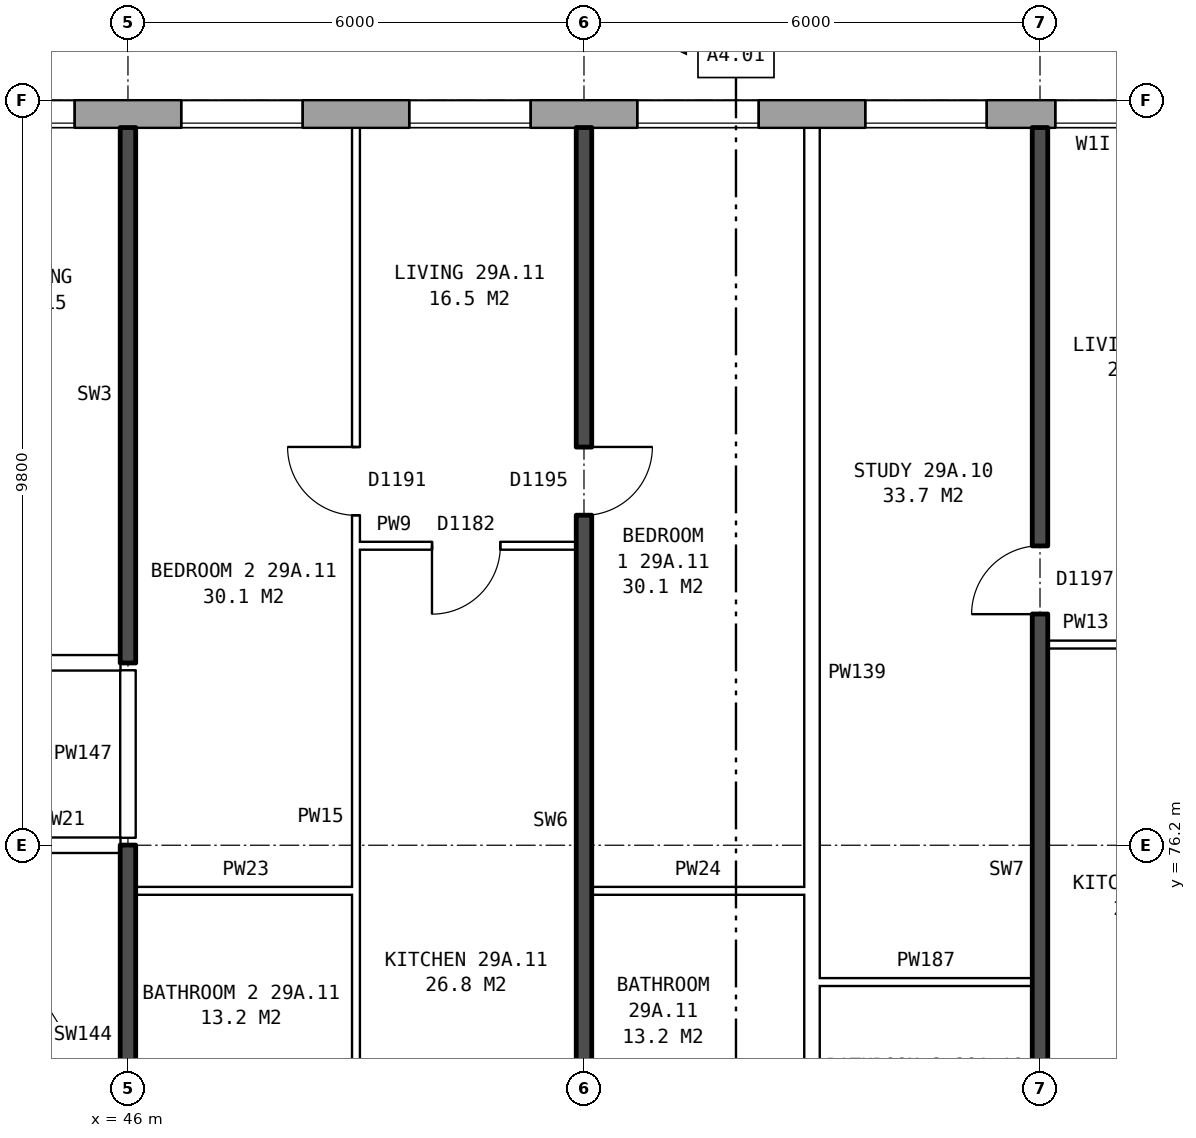
"""IFC4 building model, lengths in metres.
Left out: names, types, materials, properties, quantities, classifications, styles, units other than length and angle.
Written with IfcOpenShell. Run it as: python <this file> out.ifc"""

import sys

from ifc_helpers import new_model, si_unit, direction, frame, frame_2d, origin, place, context, subcontext, project, spatial, rectangle, extrude, element, fill, save


model = new_model("IFC4")
c1 = context("Model", 3, precision=1e-05, world=origin(), true_north=direction((0.0, 1.0)))
c2 = subcontext(c1, "Body", "Model", "MODEL_VIEW")
j1 = project(units=[si_unit("LENGTHUNIT", "METRE"), si_unit("PLANEANGLEUNIT", "RADIAN")], contexts=[c1])
p1 = place(None, origin())
s1 = spatial("IfcSite", under=j1, at=p1, CompositionType="ELEMENT")
p2 = place(p1, origin())
s2 = spatial("IfcBuilding", under=s1, at=p2, CompositionType="ELEMENT")
p3 = place(p2, frame((0.0, 0.0, 105.7)))
s3 = spatial("IfcBuildingStorey", under=s2, at=p3, CompositionType="ELEMENT", Elevation=105.7)
p4 = place(p3, frame((72.925, 85.82, 0.0), z_axis=(0.0, 0.0, 1.0), x_axis=(-1.0, 0.0, 0.0)))
e1 = element("IfcWall", 1, at=p4, inside=s3, PredefinedType="STANDARD", context=c2, shape_type="SweptSolid", body=[
    extrude(rectangle(XDim=44.851, YDim=0.36, at=frame_2d((22.425, 0.0))), origin(), (0.0, 0.0, 1.0), 2.85),
])
p5 = place(p4, frame((0.625, 0.0, 0.8)))
e2 = element("IfcOpeningElement", 2, at=p5, cuts=e1, PredefinedType="OPENING", context=c2, shape_type="SweptSolid", body=[
    extrude(rectangle(XDim=1.6, YDim=1.8, at=frame_2d((0.8, 0.9))), frame((0.0, 0.19, 0.0), z_axis=(0.0, -1.0, 0.0), x_axis=(1.0, 0.0, 0.0)), (0.0, 0.0, 1.0), 0.38),
])
p6 = place(p4, frame((3.625, 0.0, 0.8)))
e3 = element("IfcOpeningElement", 3, at=p6, cuts=e1, PredefinedType="OPENING", context=c2, shape_type="SweptSolid", body=[
    extrude(rectangle(XDim=1.6, YDim=1.8, at=frame_2d((0.8, 0.9))), frame((0.0, 0.19, 0.0), z_axis=(0.0, -1.0, 0.0), x_axis=(1.0, 0.0, 0.0)), (0.0, 0.0, 1.0), 0.38),
])
p7 = place(p4, frame((6.625, 0.0, 0.8)))
e4 = element("IfcOpeningElement", 4, at=p7, cuts=e1, PredefinedType="OPENING", context=c2, shape_type="SweptSolid", body=[
    extrude(rectangle(XDim=1.6, YDim=1.8, at=frame_2d((0.8, 0.9))), frame((0.0, 0.19, 0.0), z_axis=(0.0, -1.0, 0.0), x_axis=(1.0, 0.0, 0.0)), (0.0, 0.0, 1.0), 0.38),
])
p8 = place(p4, frame((9.125, 0.0, 0.8)))
e5 = element("IfcOpeningElement", 5, at=p8, cuts=e1, PredefinedType="OPENING", context=c2, shape_type="SweptSolid", body=[
    extrude(rectangle(XDim=1.6, YDim=1.8, at=frame_2d((0.8, 0.9))), frame((0.0, 0.19, 0.0), z_axis=(0.0, -1.0, 0.0), x_axis=(1.0, 0.0, 0.0)), (0.0, 0.0, 1.0), 0.38),
])
p9 = place(p4, frame((12.825, 0.0, 0.55)))
e6 = element("IfcOpeningElement", 6, at=p9, cuts=e1, PredefinedType="OPENING", context=c2, shape_type="SweptSolid", body=[
    extrude(rectangle(XDim=0.6, YDim=0.9, at=frame_2d((0.3, 0.45))), frame((0.0, 0.19, 0.0), z_axis=(0.0, -1.0, 0.0), x_axis=(1.0, 0.0, 0.0)), (0.0, 0.0, 1.0), 0.38),
])
p10 = place(p4, frame((15.625, 0.0, 0.8)))
e7 = element("IfcOpeningElement", 7, at=p10, cuts=e1, PredefinedType="OPENING", context=c2, shape_type="SweptSolid", body=[
    extrude(rectangle(XDim=1.6, YDim=1.8, at=frame_2d((0.8, 0.9))), frame((0.0, 0.19, 0.0), z_axis=(0.0, -1.0, 0.0), x_axis=(1.0, 0.0, 0.0)), (0.0, 0.0, 1.0), 0.38),
])
p11 = place(p4, frame((18.625, 0.0, 0.8)))
e8 = element("IfcOpeningElement", 8, at=p11, cuts=e1, PredefinedType="OPENING", context=c2, shape_type="SweptSolid", body=[
    extrude(rectangle(XDim=1.6, YDim=1.8, at=frame_2d((0.8, 0.9))), frame((0.0, 0.19, 0.0), z_axis=(0.0, -1.0, 0.0), x_axis=(1.0, 0.0, 0.0)), (0.0, 0.0, 1.0), 0.38),
])
p12 = place(p4, frame((21.625, 0.0, 0.8)))
e9 = element("IfcOpeningElement", 9, at=p12, cuts=e1, PredefinedType="OPENING", context=c2, shape_type="SweptSolid", body=[
    extrude(rectangle(XDim=1.6, YDim=1.8, at=frame_2d((0.8, 0.9))), frame((0.0, 0.19, 0.0), z_axis=(0.0, -1.0, 0.0), x_axis=(1.0, 0.0, 0.0)), (0.0, 0.0, 1.0), 0.38),
])
p13 = place(p4, frame((24.625, 0.0, 0.8)))
e10 = element("IfcOpeningElement", 10, at=p13, cuts=e1, PredefinedType="OPENING", context=c2, shape_type="SweptSolid", body=[
    extrude(rectangle(XDim=1.6, YDim=1.8, at=frame_2d((0.8, 0.9))), frame((0.0, 0.19, 0.0), z_axis=(0.0, -1.0, 0.0), x_axis=(1.0, 0.0, 0.0)), (0.0, 0.0, 1.0), 0.38),
])
p14 = place(p4, frame((27.625, 0.0, 0.8)))
e11 = element("IfcOpeningElement", 11, at=p14, cuts=e1, PredefinedType="OPENING", context=c2, shape_type="SweptSolid", body=[
    extrude(rectangle(XDim=1.6, YDim=1.8, at=frame_2d((0.8, 0.9))), frame((0.0, 0.19, 0.0), z_axis=(0.0, -1.0, 0.0), x_axis=(1.0, 0.0, 0.0)), (0.0, 0.0, 1.0), 0.38),
])
p15 = place(p4, frame((29.525, 0.0, 0.8)))
e12 = element("IfcOpeningElement", 12, at=p15, cuts=e1, PredefinedType="OPENING", context=c2, shape_type="SweptSolid", body=[
    extrude(rectangle(XDim=0.8, YDim=1.8, at=frame_2d((0.4, 0.9))), frame((0.0, 0.19, 0.0), z_axis=(0.0, -1.0, 0.0), x_axis=(1.0, 0.0, 0.0)), (0.0, 0.0, 1.0), 0.38),
])
p16 = place(p4, frame((33.325, 0.0, 1.4)))
e13 = element("IfcOpeningElement", 13, at=p16, cuts=e1, PredefinedType="OPENING", context=c2, shape_type="SweptSolid", body=[
    extrude(rectangle(XDim=1.0, YDim=1.2, at=frame_2d((0.5, 0.6))), frame((0.0, 0.19, 0.0), z_axis=(0.0, -1.0, 0.0), x_axis=(1.0, 0.0, 0.0)), (0.0, 0.0, 1.0), 0.38),
])
p17 = place(p4, frame((36.625, 0.0, 0.8)))
e14 = element("IfcOpeningElement", 14, at=p17, cuts=e1, PredefinedType="OPENING", context=c2, shape_type="SweptSolid", body=[
    extrude(rectangle(XDim=1.6, YDim=1.8, at=frame_2d((0.8, 0.9))), frame((0.0, 0.19, 0.0), z_axis=(0.0, -1.0, 0.0), x_axis=(1.0, 0.0, 0.0)), (0.0, 0.0, 1.0), 0.38),
])
p18 = place(p4, frame((39.625, 0.0, 0.8)))
e15 = element("IfcOpeningElement", 15, at=p18, cuts=e1, PredefinedType="OPENING", context=c2, shape_type="SweptSolid", body=[
    extrude(rectangle(XDim=1.6, YDim=1.8, at=frame_2d((0.8, 0.9))), frame((0.0, 0.19, 0.0), z_axis=(0.0, -1.0, 0.0), x_axis=(1.0, 0.0, 0.0)), (0.0, 0.0, 1.0), 0.38),
])
p19 = place(p4, frame((42.625, 0.0, 0.8)))
e16 = element("IfcOpeningElement", 16, at=p19, cuts=e1, PredefinedType="OPENING", context=c2, shape_type="SweptSolid", body=[
    extrude(rectangle(XDim=1.6, YDim=1.8, at=frame_2d((0.8, 0.9))), frame((0.0, 0.19, 0.0), z_axis=(0.0, -1.0, 0.0), x_axis=(1.0, 0.0, 0.0)), (0.0, 0.0, 1.0), 0.38),
])
p20 = place(p4, frame((11.025, 0.0, 1.5)))
e17 = element("IfcOpeningElement", 17, at=p20, cuts=e1, PredefinedType="OPENING", context=c2, shape_type="SweptSolid", body=[
    extrude(rectangle(XDim=0.6, YDim=0.9, at=frame_2d((0.3, 0.45))), frame((0.0, 0.19, 0.0), z_axis=(0.0, -1.0, 0.0), x_axis=(1.0, 0.0, 0.0)), (0.0, 0.0, 1.0), 0.38),
])
p21 = place(p4, frame((13.725, 0.0, 0.55)))
e18 = element("IfcOpeningElement", 18, at=p21, cuts=e1, PredefinedType="OPENING", context=c2, shape_type="SweptSolid", body=[
    extrude(rectangle(XDim=1.0, YDim=1.5, at=frame_2d((0.5, 0.75))), frame((0.0, 0.19, 0.0), z_axis=(0.0, -1.0, 0.0), x_axis=(1.0, 0.0, 0.0)), (0.0, 0.0, 1.0), 0.38),
])
p22 = place(p4, frame((30.625, 0.0, 0.8)))
e19 = element("IfcOpeningElement", 19, at=p22, cuts=e1, PredefinedType="OPENING", context=c2, shape_type="SweptSolid", body=[
    extrude(rectangle(XDim=1.0, YDim=0.9, at=frame_2d((0.5, 0.45))), frame((0.0, 0.19, 0.0), z_axis=(0.0, -1.0, 0.0), x_axis=(1.0, 0.0, 0.0)), (0.0, 0.0, 1.0), 0.38),
])
p23 = place(p4, frame((34.625, 0.0, 0.8)))
e20 = element("IfcOpeningElement", 20, at=p23, cuts=e1, PredefinedType="OPENING", context=c2, shape_type="SweptSolid", body=[
    extrude(rectangle(XDim=1.4, YDim=1.8, at=frame_2d((0.7, 0.9))), frame((0.0, 0.19, 0.0), z_axis=(0.0, -1.0, 0.0), x_axis=(1.0, 0.0, 0.0)), (0.0, 0.0, 1.0), 0.38),
])
p24 = place(p3, frame((55.1, 74.4, 0.0), z_axis=(0.0, 0.0, 1.0), x_axis=(1.0, 0.0, 0.0)))
e21 = element("IfcWall", 21, at=p24, inside=s3, PredefinedType="PARTITIONING", context=c2, shape_type="SweptSolid", body=[
    extrude(rectangle(XDim=2.8, YDim=0.1, at=frame_2d((1.4, 0.0))), origin(), (0.0, 0.0, 1.0), 2.85),
])
p25 = place(p3, frame((46.1, 75.6, 0.0), z_axis=(0.0, 0.0, 1.0), x_axis=(1.0, 0.0, 0.0)))
e22 = element("IfcWall", 22, at=p25, inside=s3, PredefinedType="PARTITIONING", context=c2, shape_type="SweptSolid", body=[
    extrude(rectangle(XDim=2.9, YDim=0.1, at=frame_2d((1.45, 0.0))), origin(), (0.0, 0.0, 1.0), 2.85),
])
p26 = place(p3, frame((52.1, 75.6, 0.0), z_axis=(0.0, 0.0, 1.0), x_axis=(1.0, 0.0, 0.0)))
e23 = element("IfcWall", 23, at=p26, inside=s3, PredefinedType="PARTITIONING", context=c2, shape_type="SweptSolid", body=[
    extrude(rectangle(XDim=2.8, YDim=0.1, at=frame_2d((1.4, 0.0))), origin(), (0.0, 0.0, 1.0), 2.85),
])
p27 = place(p3, frame((44.36, 76.2, 0.0), z_axis=(0.0, 0.0, 1.0), x_axis=(1.0, 0.0, 0.0)))
e24 = element("IfcWall", 24, at=p27, inside=s3, PredefinedType="PARTITIONING", context=c2, shape_type="SweptSolid", body=[
    extrude(rectangle(XDim=1.54, YDim=0.2, at=frame_2d((0.77, 0.0))), origin(), (0.0, 0.0, 1.0), 2.85),
])
p28 = place(p3, frame((25.36, 78.6, 0.0), z_axis=(0.0, 0.0, 1.0), x_axis=(1.0, 0.0, 0.0)))
e25 = element("IfcWall", 25, at=p28, inside=s3, PredefinedType="PARTITIONING", context=c2, shape_type="SweptSolid", body=[
    extrude(rectangle(XDim=20.54, YDim=0.2, at=frame_2d((10.27, 0.0))), origin(), (0.0, 0.0, 1.0), 2.85),
])
p29 = place(p28, frame((18.09, 0.0, 0.0)))
e26 = element("IfcOpeningElement", 26, at=p29, cuts=e25, PredefinedType="OPENING", context=c2, shape_type="SweptSolid", body=[
    extrude(rectangle(XDim=1.0, YDim=2.1, at=frame_2d((0.5, 1.05))), frame((0.0, 0.11, 0.0), z_axis=(0.0, -1.0, 0.0), x_axis=(1.0, 0.0, 0.0)), (0.0, 0.0, 1.0), 0.22),
])
p30 = place(p28, frame((12.14, 0.0, 0.0)))
e27 = element("IfcOpeningElement", 27, at=p30, cuts=e25, PredefinedType="OPENING", context=c2, shape_type="SweptSolid", body=[
    extrude(rectangle(XDim=1.0, YDim=2.1, at=frame_2d((0.5, 1.05))), frame((0.0, 0.11, 0.0), z_axis=(0.0, -1.0, 0.0), x_axis=(1.0, 0.0, 0.0)), (0.0, 0.0, 1.0), 0.22),
])
p31 = place(p28, frame((6.34, 0.0, 0.0)))
e28 = element("IfcOpeningElement", 28, at=p31, cuts=e25, PredefinedType="OPENING", context=c2, shape_type="SweptSolid", body=[
    extrude(rectangle(XDim=1.0, YDim=2.1, at=frame_2d((0.5, 1.05))), frame((0.0, 0.11, 0.0), z_axis=(0.0, -1.0, 0.0), x_axis=(1.0, 0.0, 0.0)), (0.0, 0.0, 1.0), 0.22),
])
p32 = place(p3, frame((58.1, 78.84, 0.0), z_axis=(0.0, 0.0, 1.0), x_axis=(1.0, 0.0, 0.0)))
e29 = element("IfcWall", 29, at=p32, inside=s3, PredefinedType="PARTITIONING", context=c2, shape_type="SweptSolid", body=[
    extrude(rectangle(XDim=2.9, YDim=0.1, at=frame_2d((1.45, 0.0))), origin(), (0.0, 0.0, 1.0), 2.85),
])
p33 = place(p32, frame((1.0, 0.0, 0.0)))
e30 = element("IfcOpeningElement", 30, at=p33, cuts=e29, PredefinedType="OPENING", context=c2, shape_type="SweptSolid", body=[
    extrude(rectangle(XDim=0.9, YDim=2.1, at=frame_2d((0.45, 1.05))), frame((0.0, 0.06, 0.0), z_axis=(0.0, -1.0, 0.0), x_axis=(1.0, 0.0, 0.0)), (0.0, 0.0, 1.0), 0.12),
])
p34 = place(p3, frame((49.0, 80.14, 0.0), z_axis=(0.0, 0.0, 1.0), x_axis=(1.0, 0.0, 0.0)))
e31 = element("IfcWall", 31, at=p34, inside=s3, PredefinedType="PARTITIONING", context=c2, shape_type="SweptSolid", body=[
    extrude(rectangle(XDim=2.9, YDim=0.1, at=frame_2d((1.45, 0.0))), origin(), (0.0, 0.0, 1.0), 2.85),
])
p35 = place(p34, frame((1.0, 0.0, 0.0)))
e32 = element("IfcOpeningElement", 32, at=p35, cuts=e31, PredefinedType="OPENING", context=c2, shape_type="SweptSolid", body=[
    extrude(rectangle(XDim=0.9, YDim=2.1, at=frame_2d((0.45, 1.05))), frame((0.0, 0.06, 0.0), z_axis=(0.0, -1.0, 0.0), x_axis=(1.0, 0.0, 0.0)), (0.0, 0.0, 1.0), 0.12),
])
p36 = place(p3, frame((46.0, 71.2, 0.0), z_axis=(0.0, 0.0, 1.0), x_axis=(0.0, 1.0, 0.0)))
e33 = element("IfcWall", 33, at=p36, inside=s3, PredefinedType="SOLIDWALL", context=c2, shape_type="SweptSolid", body=[
    extrude(rectangle(XDim=5.0, YDim=0.2, at=frame_2d((2.5, 0.0))), origin(), (0.0, 0.0, 1.0), 2.85),
])
p37 = place(p3, frame((46.0, 76.3, 0.0), z_axis=(0.0, 0.0, 1.0), x_axis=(0.0, 1.0, 0.0)))
e34 = element("IfcWall", 34, at=p37, inside=s3, PredefinedType="PARTITIONING", context=c2, shape_type="SweptSolid", body=[
    extrude(rectangle(XDim=2.2, YDim=0.2, at=frame_2d((1.1, 0.0))), origin(), (0.0, 0.0, 1.0), 2.85),
])
p38 = place(p3, frame((46.0, 78.6, 0.0), z_axis=(0.0, 0.0, 1.0), x_axis=(0.0, 1.0, 0.0)))
e35 = element("IfcWall", 35, at=p38, inside=s3, PredefinedType="SOLIDWALL", context=c2, shape_type="SweptSolid", body=[
    extrude(rectangle(XDim=7.04, YDim=0.2, at=frame_2d((3.52, 0.0))), origin(), (0.0, 0.0, 1.0), 2.85),
])
p39 = place(p3, frame((49.0, 71.3, 0.0), z_axis=(0.0, 0.0, 1.0), x_axis=(0.0, 1.0, 0.0)))
e36 = element("IfcWall", 36, at=p39, inside=s3, PredefinedType="PARTITIONING", context=c2, shape_type="SweptSolid", body=[
    extrude(rectangle(XDim=14.34, YDim=0.1, at=frame_2d((7.17, 0.0))), origin(), (0.0, 0.0, 1.0), 2.85),
])
p40 = place(p39, frame((9.24, 0.0, 0.0)))
e37 = element("IfcOpeningElement", 37, at=p40, cuts=e36, PredefinedType="OPENING", context=c2, shape_type="SweptSolid", body=[
    extrude(rectangle(XDim=0.9, YDim=2.1, at=frame_2d((0.45, 1.05))), frame((0.0, 0.06, 0.0), z_axis=(0.0, -1.0, 0.0), x_axis=(1.0, 0.0, 0.0)), (0.0, 0.0, 1.0), 0.12),
])
p41 = place(p39, frame((0.4, 0.0, 0.0)))
e38 = element("IfcOpeningElement", 38, at=p41, cuts=e36, PredefinedType="OPENING", context=c2, shape_type="SweptSolid", body=[
    extrude(rectangle(XDim=0.9, YDim=2.1, at=frame_2d((0.45, 1.05))), frame((0.0, 0.06, 0.0), z_axis=(0.0, -1.0, 0.0), x_axis=(1.0, 0.0, 0.0)), (0.0, 0.0, 1.0), 0.12),
])
p42 = place(p3, frame((52.0, 71.2, 0.0), z_axis=(0.0, 0.0, 1.0), x_axis=(0.0, 1.0, 0.0)))
e39 = element("IfcWall", 39, at=p42, inside=s3, PredefinedType="SOLIDWALL", context=c2, shape_type="SweptSolid", body=[
    extrude(rectangle(XDim=14.44, YDim=0.2, at=frame_2d((7.22, 0.0))), origin(), (0.0, 0.0, 1.0), 2.85),
])
p43 = place(p42, frame((9.34, 0.0, 0.0)))
e40 = element("IfcOpeningElement", 40, at=p43, cuts=e39, PredefinedType="OPENING", context=c2, shape_type="SweptSolid", body=[
    extrude(rectangle(XDim=0.9, YDim=2.1, at=frame_2d((0.45, 1.05))), frame((0.0, 0.11, 0.0), z_axis=(0.0, -1.0, 0.0), x_axis=(1.0, 0.0, 0.0)), (0.0, 0.0, 1.0), 0.22),
])
p44 = place(p42, frame((0.4, 0.0, 0.0)))
e41 = element("IfcOpeningElement", 41, at=p44, cuts=e39, PredefinedType="OPENING", context=c2, shape_type="SweptSolid", body=[
    extrude(rectangle(XDim=0.9, YDim=2.1, at=frame_2d((0.45, 1.05))), frame((0.0, 0.11, 0.0), z_axis=(0.0, -1.0, 0.0), x_axis=(1.0, 0.0, 0.0)), (0.0, 0.0, 1.0), 0.22),
])
p45 = place(p3, frame((55.0, 71.3, 0.0), z_axis=(0.0, 0.0, 1.0), x_axis=(0.0, 1.0, 0.0)))
e42 = element("IfcWall", 42, at=p45, inside=s3, PredefinedType="PARTITIONING", context=c2, shape_type="SweptSolid", body=[
    extrude(rectangle(XDim=14.34, YDim=0.2, at=frame_2d((7.17, 0.0))), origin(), (0.0, 0.0, 1.0), 2.85),
])
p46 = place(p3, frame((58.0, 71.2, 0.0), z_axis=(0.0, 0.0, 1.0), x_axis=(0.0, 1.0, 0.0)))
e43 = element("IfcWall", 43, at=p46, inside=s3, PredefinedType="SOLIDWALL", context=c2, shape_type="SweptSolid", body=[
    extrude(rectangle(XDim=14.44, YDim=0.2, at=frame_2d((7.22, 0.0))), origin(), (0.0, 0.0, 1.0), 2.85),
])
p47 = place(p46, frame((8.04, 0.0, 0.0)))
e44 = element("IfcOpeningElement", 44, at=p47, cuts=e43, PredefinedType="OPENING", context=c2, shape_type="SweptSolid", body=[
    extrude(rectangle(XDim=0.9, YDim=2.1, at=frame_2d((0.45, 1.05))), frame((0.0, 0.11, 0.0), z_axis=(0.0, -1.0, 0.0), x_axis=(1.0, 0.0, 0.0)), (0.0, 0.0, 1.0), 0.22),
])
p48 = place(p46, frame((0.4, 0.0, 0.0)))
e45 = element("IfcOpeningElement", 45, at=p48, cuts=e43, PredefinedType="OPENING", context=c2, shape_type="SweptSolid", body=[
    extrude(rectangle(XDim=0.9, YDim=2.1, at=frame_2d((0.45, 1.05))), frame((0.0, 0.11, 0.0), z_axis=(0.0, -1.0, 0.0), x_axis=(1.0, 0.0, 0.0)), (0.0, 0.0, 1.0), 0.22),
])
p49 = place(p10, origin())
e46 = element("IfcWindow", 46, at=p49, inside=s3, PartitioningType="SINGLE_PANEL", PredefinedType="WINDOW", context=c2, shape_type="SweptSolid", body=[
    extrude(rectangle(XDim=1.6, YDim=1.8, at=frame_2d((0.8, 0.9))), frame((0.0, 0.15, 0.0), z_axis=(0.0, -1.0, 0.0), x_axis=(1.0, 0.0, 0.0)), (0.0, 0.0, 1.0), 0.06),
])
fill(e7, e46)
p50 = place(p11, origin())
e47 = element("IfcWindow", 47, at=p50, inside=s3, PartitioningType="SINGLE_PANEL", PredefinedType="WINDOW", context=c2, shape_type="SweptSolid", body=[
    extrude(rectangle(XDim=1.6, YDim=1.8, at=frame_2d((0.8, 0.9))), frame((0.0, 0.15, 0.0), z_axis=(0.0, -1.0, 0.0), x_axis=(1.0, 0.0, 0.0)), (0.0, 0.0, 1.0), 0.06),
])
fill(e8, e47)
p51 = place(p12, origin())
e48 = element("IfcWindow", 48, at=p51, inside=s3, PartitioningType="SINGLE_PANEL", PredefinedType="WINDOW", context=c2, shape_type="SweptSolid", body=[
    extrude(rectangle(XDim=1.6, YDim=1.8, at=frame_2d((0.8, 0.9))), frame((0.0, 0.15, 0.0), z_axis=(0.0, -1.0, 0.0), x_axis=(1.0, 0.0, 0.0)), (0.0, 0.0, 1.0), 0.06),
])
fill(e9, e48)
p52 = place(p13, origin())
e49 = element("IfcWindow", 49, at=p52, inside=s3, PartitioningType="SINGLE_PANEL", PredefinedType="WINDOW", context=c2, shape_type="SweptSolid", body=[
    extrude(rectangle(XDim=1.6, YDim=1.8, at=frame_2d((0.8, 0.9))), frame((0.0, 0.15, 0.0), z_axis=(0.0, -1.0, 0.0), x_axis=(1.0, 0.0, 0.0)), (0.0, 0.0, 1.0), 0.06),
])
fill(e10, e49)
p53 = place(p14, origin())
e50 = element("IfcWindow", 50, at=p53, inside=s3, PartitioningType="SINGLE_PANEL", PredefinedType="WINDOW", context=c2, shape_type="SweptSolid", body=[
    extrude(rectangle(XDim=1.6, YDim=1.8, at=frame_2d((0.8, 0.9))), frame((0.0, 0.15, 0.0), z_axis=(0.0, -1.0, 0.0), x_axis=(1.0, 0.0, 0.0)), (0.0, 0.0, 1.0), 0.06),
])
fill(e11, e50)
p54 = place(p47, origin())
e51 = element("IfcDoor", 51, at=p54, inside=s3, OperationType="SINGLE_SWING_LEFT", PredefinedType="DOOR", context=c2, shape_type="SweptSolid", body=[
    extrude(rectangle(XDim=0.9, YDim=2.1, at=frame_2d((0.45, 1.05))), frame((0.0, 0.025, 0.0), z_axis=(0.0, -1.0, 0.0), x_axis=(1.0, 0.0, 0.0)), (0.0, 0.0, 1.0), 0.05),
])
fill(e44, e51)
p55 = place(p43, frame((0.9, 0.0, 0.0), z_axis=(0.0, 0.0, 1.0), x_axis=(-1.0, 0.0, 0.0)))
e52 = element("IfcDoor", 52, at=p55, inside=s3, OperationType="SINGLE_SWING_LEFT", PredefinedType="DOOR", context=c2, shape_type="SweptSolid", body=[
    extrude(rectangle(XDim=0.9, YDim=2.1, at=frame_2d((0.45, 1.05))), frame((0.0, 0.025, 0.0), z_axis=(0.0, -1.0, 0.0), x_axis=(1.0, 0.0, 0.0)), (0.0, 0.0, 1.0), 0.05),
])
fill(e40, e52)
p56 = place(p40, origin())
e53 = element("IfcDoor", 53, at=p56, inside=s3, OperationType="SINGLE_SWING_RIGHT", PredefinedType="DOOR", context=c2, shape_type="SweptSolid", body=[
    extrude(rectangle(XDim=0.9, YDim=2.1, at=frame_2d((0.45, 1.05))), frame((0.0, 0.025, 0.0), z_axis=(0.0, -1.0, 0.0), x_axis=(1.0, 0.0, 0.0)), (0.0, 0.0, 1.0), 0.05),
])
fill(e37, e53)
p57 = place(p35, frame((0.9, 0.0, 0.0), z_axis=(0.0, 0.0, 1.0), x_axis=(-1.0, 0.0, 0.0)))
e54 = element("IfcDoor", 54, at=p57, inside=s3, OperationType="SINGLE_SWING_RIGHT", PredefinedType="DOOR", context=c2, shape_type="SweptSolid", body=[
    extrude(rectangle(XDim=0.9, YDim=2.1, at=frame_2d((0.45, 1.05))), frame((0.0, 0.025, 0.0), z_axis=(0.0, -1.0, 0.0), x_axis=(1.0, 0.0, 0.0)), (0.0, 0.0, 1.0), 0.05),
])
fill(e32, e54)
p58 = place(p21, origin())
e55 = element("IfcWindow", 55, at=p58, inside=s3, PartitioningType="SINGLE_PANEL", PredefinedType="WINDOW", context=c2, shape_type="SweptSolid", body=[
    extrude(rectangle(XDim=1.0, YDim=1.5, at=frame_2d((0.5, 0.75))), frame((0.0, 0.15, 0.0), z_axis=(0.0, -1.0, 0.0), x_axis=(1.0, 0.0, 0.0)), (0.0, 0.0, 1.0), 0.06),
])
fill(e18, e55)
save(model, sys.argv[1])
